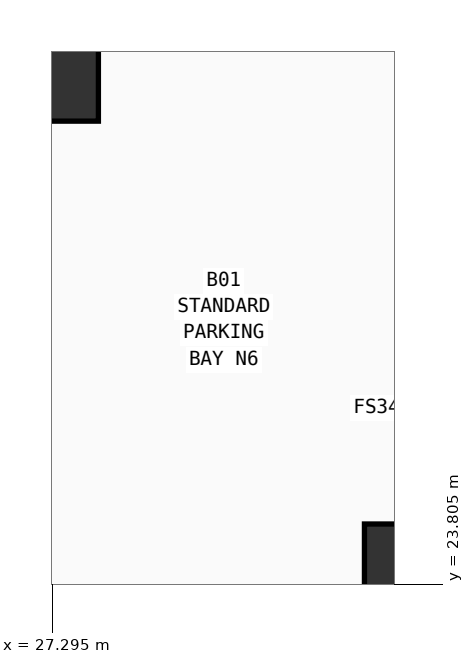
"""IFC4 building model, lengths in metres.
Left out: names, types, materials, properties, quantities, classifications, styles, units other than length and angle.
Written with IfcOpenShell. Run it as: python <this file> out.ifc"""

import sys

from ifc_helpers import new_model, si_unit, direction, frame, origin, origin_2d, place, context, subcontext, project, spatial, rectangle, circle, extrude, element, save


model = new_model("IFC4")
c1 = context("Model", 3, precision=1e-05, world=origin(), true_north=direction((0.0, 1.0)))
c2 = subcontext(c1, "Body", "Model", "MODEL_VIEW")
j1 = project(units=[si_unit("LENGTHUNIT", "METRE"), si_unit("PLANEANGLEUNIT", "RADIAN")], contexts=[c1])
p1 = place(None, origin())
s1 = spatial("IfcSite", under=j1, at=p1, CompositionType="ELEMENT")
p2 = place(p1, origin())
s2 = spatial("IfcBuilding", under=s1, at=p2, CompositionType="ELEMENT")
p3 = place(p2, frame((0.0, 0.0, -4.2)))
s3 = spatial("IfcBuildingStorey", under=s2, at=p3, CompositionType="ELEMENT", Elevation=-4.2)
p4 = place(p3, frame((27.2, 30.6, 0.0), z_axis=(0.0, 0.0, 1.0), x_axis=(1.0, 0.0, 0.0)))
e1 = element("IfcColumn", 1, at=p4, inside=s3, PredefinedType="COLUMN", context=c2, shape_type="SweptSolid", body=[
    extrude(rectangle(XDim=1.4, YDim=1.4, at=origin_2d()), origin(), (0.0, 0.0, 1.0), 3.82),
])
p5 = place(p3, frame((32.0, 24.0, 0.0), z_axis=(0.0, 0.0, 1.0), x_axis=(1.0, 0.0, 0.0)))
e2 = element("IfcColumn", 2, at=p5, inside=s3, PredefinedType="COLUMN", context=c2, shape_type="SweptSolid", body=[
    extrude(circle(Radius=0.6, at=origin_2d()), origin(), (0.0, 0.0, 1.0), 3.82),
])
save(model, sys.argv[1])
